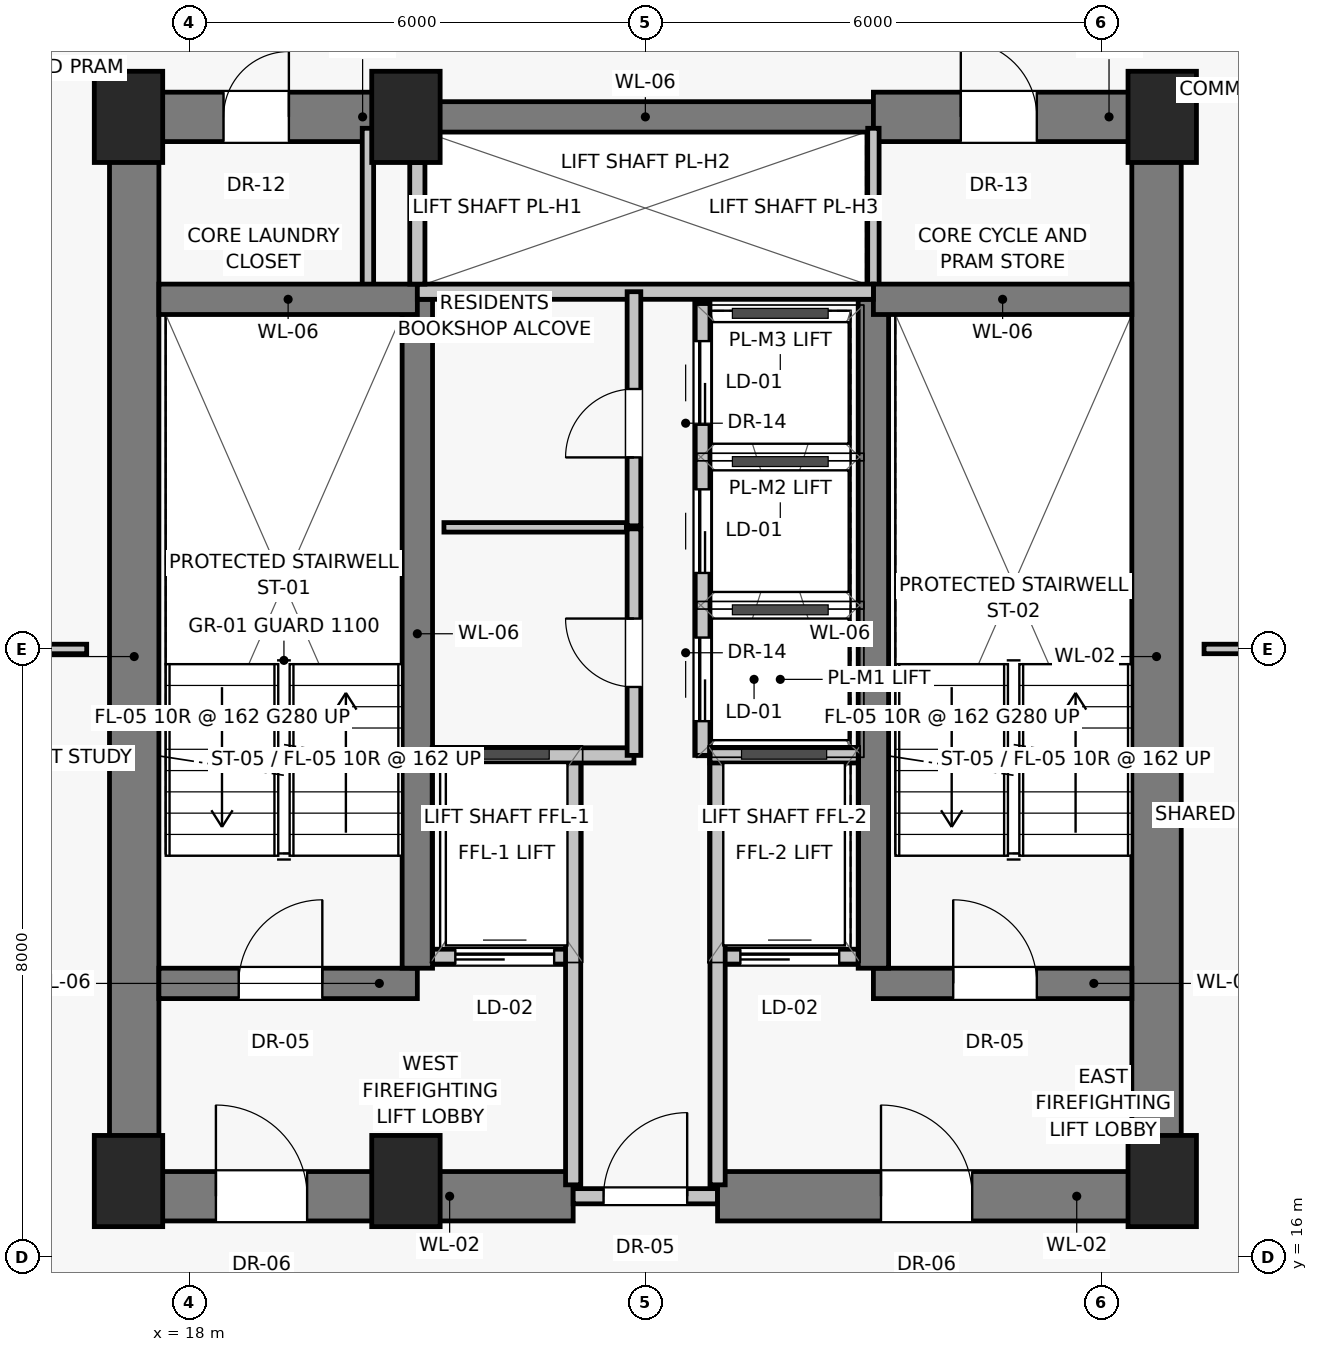
"""IFC4 building model, lengths in metres.
Left out: names, types, materials, properties, quantities, classifications, styles, units other than length and angle.
Written with IfcOpenShell. Run it as: python <this file> out.ifc"""

import sys

from ifc_helpers import new_model, si_unit, direction, frame, frame_2d, origin, origin_2d, place, context, subcontext, project, spatial, rectangle, extrude, source, transform, mapped, element, fill, save


model = new_model("IFC4")
c1 = context("Model", 3, precision=1e-05, world=origin(), true_north=direction((0.0, 1.0)))
c2 = subcontext(c1, "Body", "Model", "MODEL_VIEW")
j1 = project(units=[si_unit("LENGTHUNIT", "METRE"), si_unit("PLANEANGLEUNIT", "RADIAN")], contexts=[c1])
p1 = place(None, origin())
s1 = spatial("IfcSite", under=j1, at=p1, CompositionType="ELEMENT")
p2 = place(p1, origin())
s2 = spatial("IfcBuilding", under=s1, at=p2, CompositionType="ELEMENT")
p3 = place(p2, frame((0.0, 0.0, 102.45)))
s3 = spatial("IfcBuildingStorey", under=s2, at=p3, CompositionType="ELEMENT", Elevation=102.45)
for number, where, z_axis, x_axis in (
    (1, (17.2, 17.0, 0.0), (0.0, 0.0, 1.0), (1.0, 0.0, 0.0)),
    (2, (20.85, 17.0, 0.0), (0.0, 0.0, 1.0), (1.0, 0.0, 0.0)),
    (3, (30.8, 17.0, 0.0), (0.0, 0.0, 1.0), (1.0, 0.0, 0.0)),
    (4, (17.2, 31.0, 0.0), (0.0, 0.0, 1.0), (1.0, 0.0, 0.0)),
    (5, (20.85, 31.0, 0.0), (0.0, 0.0, 1.0), (1.0, 0.0, 0.0)),
    (6, (30.8, 31.0, 0.0), (0.0, 0.0, 1.0), (1.0, 0.0, 0.0)),
):
    element("IfcColumn", number, at=place(p3, frame(where, z_axis=z_axis, x_axis=x_axis)), inside=s3, PredefinedType="PILASTER", context=c2, shape_type="SweptSolid", body=[
        extrude(rectangle(XDim=0.9, YDim=1.2, at=origin_2d()), origin(), (0.0, 0.0, 1.0), 3.25),
    ])
for number, where, z_axis, x_axis in (
    (7, (17.275, 16.8, 0.0), (0.0, 0.0, 1.0), (0.0, 1.0, 0.0)),
    (8, (30.725, 16.8, 0.0), (0.0, 0.0, 1.0), (0.0, 1.0, 0.0)),
):
    element("IfcWall", number, at=place(p3, frame(where, z_axis=z_axis, x_axis=x_axis)), inside=s3, PredefinedType="SHEAR", context=c2, shape_type="SweptSolid", body=[
        extrude(rectangle(XDim=14.2, YDim=0.65, at=frame_2d((7.1, 0.0))), origin(), (0.0, 0.0, 1.0), 3.0),
    ])
p4 = place(p3, frame((17.2, 16.8, 0.0), z_axis=(0.0, 0.0, 1.0), x_axis=(1.0, 0.0, 0.0)))
e9 = element("IfcWall", 9, at=p4, inside=s3, PredefinedType="SHEAR", context=c2, shape_type="SweptSolid", body=[
    extrude(rectangle(XDim=5.85, YDim=0.65, at=frame_2d((2.925, 0.0))), origin(), (0.0, 0.0, 1.0), 3.0),
])
p5 = place(p4, frame((1.15, 0.0, 0.0)))
e10 = element("IfcOpeningElement", 10, at=p5, cuts=e9, PredefinedType="OPENING", context=c2, shape_type="SweptSolid", body=[
    extrude(rectangle(XDim=1.2, YDim=2.03, at=frame_2d((0.6, 1.015))), frame((0.0, 0.335, 0.0), z_axis=(0.0, -1.0, 0.0), x_axis=(1.0, 0.0, 0.0)), (0.0, 0.0, 1.0), 0.67),
])
p6 = place(p3, frame((23.05, 16.8, 0.0), z_axis=(0.0, 0.0, 1.0), x_axis=(1.0, 0.0, 0.0)))
e11 = element("IfcWall", 11, at=p6, inside=s3, PredefinedType="SOLIDWALL", context=c2, shape_type="SweptSolid", body=[
    extrude(rectangle(XDim=1.9, YDim=0.2, at=frame_2d((0.95, 0.0))), origin(), (0.0, 0.0, 1.0), 2.15),
])
p7 = place(p6, frame((0.4, 0.0, 0.0)))
e12 = element("IfcOpeningElement", 12, at=p7, cuts=e11, PredefinedType="OPENING", context=c2, shape_type="SweptSolid", body=[
    extrude(rectangle(XDim=1.1, YDim=2.03, at=frame_2d((0.55, 1.015))), frame((0.0, 0.11, 0.0), z_axis=(0.0, -1.0, 0.0), x_axis=(1.0, 0.0, 0.0)), (0.0, 0.0, 1.0), 0.22),
])
p8 = place(p3, frame((24.95, 16.8, 0.0), z_axis=(0.0, 0.0, 1.0), x_axis=(1.0, 0.0, 0.0)))
e13 = element("IfcWall", 13, at=p8, inside=s3, PredefinedType="SHEAR", context=c2, shape_type="SweptSolid", body=[
    extrude(rectangle(XDim=5.85, YDim=0.65, at=frame_2d((2.925, 0.0))), origin(), (0.0, 0.0, 1.0), 3.0),
])
p9 = place(p8, frame((2.15, 0.0, 0.0)))
e14 = element("IfcOpeningElement", 14, at=p9, cuts=e13, PredefinedType="OPENING", context=c2, shape_type="SweptSolid", body=[
    extrude(rectangle(XDim=1.2, YDim=2.03, at=frame_2d((0.6, 1.015))), frame((0.0, 0.335, 0.0), z_axis=(0.0, -1.0, 0.0), x_axis=(1.0, 0.0, 0.0)), (0.0, 0.0, 1.0), 0.67),
])
p10 = place(p3, frame((17.2, 31.0, 0.0), z_axis=(0.0, 0.0, 1.0), x_axis=(1.0, 0.0, 0.0)))
e15 = element("IfcWall", 15, at=p10, inside=s3, PredefinedType="SHEAR", context=c2, shape_type="SweptSolid", body=[
    extrude(rectangle(XDim=3.8, YDim=0.65, at=frame_2d((1.9, 0.0))), origin(), (0.0, 0.0, 1.0), 3.0),
])
p11 = place(p10, frame((1.25, 0.0, 0.0)))
e16 = element("IfcOpeningElement", 16, at=p11, cuts=e15, PredefinedType="OPENING", context=c2, shape_type="SweptSolid", body=[
    extrude(rectangle(XDim=0.86, YDim=2.01, at=frame_2d((0.43, 1.005))), frame((0.0, 0.335, 0.0), z_axis=(0.0, -1.0, 0.0), x_axis=(1.0, 0.0, 0.0)), (0.0, 0.0, 1.0), 0.67),
])
p12 = place(p3, frame((21.0, 31.0, 0.0), z_axis=(0.0, 0.0, 1.0), x_axis=(1.0, 0.0, 0.0)))
e17 = element("IfcWall", 17, at=p12, inside=s3, PredefinedType="SHEAR", context=c2, shape_type="SweptSolid", body=[
    extrude(rectangle(XDim=6.0, YDim=0.4, at=frame_2d((3.0, 0.0))), origin(), (0.0, 0.0, 1.0), 3.0),
])
p13 = place(p3, frame((27.0, 31.0, 0.0), z_axis=(0.0, 0.0, 1.0), x_axis=(1.0, 0.0, 0.0)))
e18 = element("IfcWall", 18, at=p13, inside=s3, PredefinedType="SHEAR", context=c2, shape_type="SweptSolid", body=[
    extrude(rectangle(XDim=3.8, YDim=0.65, at=frame_2d((1.9, 0.0))), origin(), (0.0, 0.0, 1.0), 3.0),
])
p14 = place(p13, frame((1.15, 0.0, 0.0)))
e19 = element("IfcOpeningElement", 19, at=p14, cuts=e18, PredefinedType="OPENING", context=c2, shape_type="SweptSolid", body=[
    extrude(rectangle(XDim=1.0, YDim=2.01, at=frame_2d((0.5, 1.005))), frame((0.0, 0.335, 0.0), z_axis=(0.0, -1.0, 0.0), x_axis=(1.0, 0.0, 0.0)), (0.0, 0.0, 1.0), 0.67),
])
for number, where, z_axis, x_axis in (
    (20, (20.35, 28.65, 0.0), (0.0, 0.0, 1.0), (0.0, 1.0, 0.0)),
    (21, (27.0, 28.65, 0.0), (0.0, 0.0, 1.0), (0.0, 1.0, 0.0)),
):
    element("IfcWall", number, at=place(p3, frame(where, z_axis=z_axis, x_axis=x_axis)), inside=s3, PredefinedType="PARTITIONING", context=c2, shape_type="SweptSolid", body=[
        extrude(rectangle(XDim=2.2, YDim=0.15, at=frame_2d((1.1, 0.0))), origin(), (0.0, 0.0, 1.0), 3.0),
    ])
p15 = place(p3, frame((17.6, 19.6, 0.0), z_axis=(0.0, 0.0, 1.0), x_axis=(1.0, 0.0, 0.0)))
e22 = element("IfcWall", 22, at=p15, inside=s3, PredefinedType="SHEAR", context=c2, shape_type="SweptSolid", body=[
    extrude(rectangle(XDim=3.4, YDim=0.4, at=frame_2d((1.7, 0.0))), origin(), (0.0, 0.0, 1.0), 3.0),
])
p16 = place(p15, frame((1.05, 0.0, 0.0)))
e23 = element("IfcOpeningElement", 23, at=p16, cuts=e22, PredefinedType="OPENING", context=c2, shape_type="SweptSolid", body=[
    extrude(rectangle(XDim=1.1, YDim=2.03, at=frame_2d((0.55, 1.015))), frame((0.0, 0.21, 0.0), z_axis=(0.0, -1.0, 0.0), x_axis=(1.0, 0.0, 0.0)), (0.0, 0.0, 1.0), 0.42),
])
p17 = place(p3, frame((21.2, 19.95, 0.0), z_axis=(0.0, 0.0, 1.0), x_axis=(1.0, 0.0, 0.0)))
e24 = element("IfcWall", 24, at=p17, inside=s3, PredefinedType="SOLIDWALL", context=c2, shape_type="SweptSolid", body=[
    extrude(rectangle(XDim=1.85, YDim=0.2, at=frame_2d((0.925, 0.0))), origin(), (0.0, 0.0, 1.0), 3.0),
])
p18 = place(p17, frame((0.3, 0.0, 0.0)))
e25 = element("IfcOpeningElement", 25, at=p18, cuts=e24, PredefinedType="OPENING", context=c2, shape_type="SweptSolid", body=[
    extrude(rectangle(XDim=1.3, YDim=2.25, at=frame_2d((0.65, 1.125))), frame((0.0, 0.11, 0.0), z_axis=(0.0, -1.0, 0.0), x_axis=(1.0, 0.0, 0.0)), (0.0, 0.0, 1.0), 0.22),
])
p19 = place(p3, frame((24.95, 19.95, 0.0), z_axis=(0.0, 0.0, 1.0), x_axis=(1.0, 0.0, 0.0)))
e26 = element("IfcWall", 26, at=p19, inside=s3, PredefinedType="SOLIDWALL", context=c2, shape_type="SweptSolid", body=[
    extrude(rectangle(XDim=1.85, YDim=0.2, at=frame_2d((0.925, 0.0))), origin(), (0.0, 0.0, 1.0), 3.0),
])
p20 = place(p19, frame((0.3, 0.0, 0.0)))
e27 = element("IfcOpeningElement", 27, at=p20, cuts=e26, PredefinedType="OPENING", context=c2, shape_type="SweptSolid", body=[
    extrude(rectangle(XDim=1.3, YDim=2.25, at=frame_2d((0.65, 1.125))), frame((0.0, 0.11, 0.0), z_axis=(0.0, -1.0, 0.0), x_axis=(1.0, 0.0, 0.0)), (0.0, 0.0, 1.0), 0.22),
])
p21 = place(p3, frame((27.0, 19.6, 0.0), z_axis=(0.0, 0.0, 1.0), x_axis=(1.0, 0.0, 0.0)))
e28 = element("IfcWall", 28, at=p21, inside=s3, PredefinedType="SHEAR", context=c2, shape_type="SweptSolid", body=[
    extrude(rectangle(XDim=3.4, YDim=0.4, at=frame_2d((1.7, 0.0))), origin(), (0.0, 0.0, 1.0), 3.0),
])
p22 = place(p21, frame((1.05, 0.0, 0.0)))
e29 = element("IfcOpeningElement", 29, at=p22, cuts=e28, PredefinedType="OPENING", context=c2, shape_type="SweptSolid", body=[
    extrude(rectangle(XDim=1.1, YDim=2.03, at=frame_2d((0.55, 1.015))), frame((0.0, 0.21, 0.0), z_axis=(0.0, -1.0, 0.0), x_axis=(1.0, 0.0, 0.0)), (0.0, 0.0, 1.0), 0.42),
])
for number, where, z_axis, x_axis in (
    (30, (21.0, 19.8, 0.0), (0.0, 0.0, 1.0), (0.0, 1.0, 0.0)),
    (31, (27.0, 19.8, 0.0), (0.0, 0.0, 1.0), (0.0, 1.0, 0.0)),
):
    element("IfcWall", number, at=place(p3, frame(where, z_axis=z_axis, x_axis=x_axis)), inside=s3, PredefinedType="SHEAR", context=c2, shape_type="SweptSolid", body=[
        extrude(rectangle(XDim=8.8, YDim=0.4, at=frame_2d((4.4, 0.0))), origin(), (0.0, 0.0, 1.0), 3.0),
    ])
for number, where, z_axis, x_axis in (
    (32, (17.6, 28.6, 0.0), (0.0, 0.0, 1.0), (1.0, 0.0, 0.0)),
    (33, (27.0, 28.6, 0.0), (0.0, 0.0, 1.0), (1.0, 0.0, 0.0)),
):
    element("IfcWall", number, at=place(p3, frame(where, z_axis=z_axis, x_axis=x_axis)), inside=s3, PredefinedType="SHEAR", context=c2, shape_type="SweptSolid", body=[
        extrude(rectangle(XDim=3.4, YDim=0.4, at=frame_2d((1.7, 0.0))), origin(), (0.0, 0.0, 1.0), 3.0),
    ])
for number, where, z_axis, x_axis in (
    (34, (23.05, 16.95, 0.0), (0.0, 0.0, 1.0), (0.0, 1.0, 0.0)),
    (35, (24.95, 16.95, 0.0), (0.0, 0.0, 1.0), (0.0, 1.0, 0.0)),
):
    element("IfcWall", number, at=place(p3, frame(where, z_axis=z_axis, x_axis=x_axis)), inside=s3, PredefinedType="SOLIDWALL", context=c2, shape_type="SweptSolid", body=[
        extrude(rectangle(XDim=5.6, YDim=0.2, at=frame_2d((2.8, 0.0))), origin(), (0.0, 0.0, 1.0), 3.0),
    ])
p23 = place(p3, frame((21.2, 22.6, 0.0), z_axis=(0.0, 0.0, 1.0), x_axis=(1.0, 0.0, 0.0)))
e36 = element("IfcWall", 36, at=p23, inside=s3, PredefinedType="SOLIDWALL", context=c2, shape_type="SweptSolid", body=[
    extrude(rectangle(XDim=2.65, YDim=0.2, at=frame_2d((1.325, 0.0))), origin(), (0.0, 0.0, 1.0), 3.0),
])
p24 = place(p3, frame((24.85, 22.6, 0.0), z_axis=(0.0, 0.0, 1.0), x_axis=(1.0, 0.0, 0.0)))
e37 = element("IfcWall", 37, at=p24, inside=s3, PredefinedType="SOLIDWALL", context=c2, shape_type="SweptSolid", body=[
    extrude(rectangle(XDim=1.95, YDim=0.2, at=frame_2d((0.975, 0.0))), origin(), (0.0, 0.0, 1.0), 3.0),
])
p25 = place(p3, frame((21.0, 28.7, 0.0), z_axis=(0.0, 0.0, 1.0), x_axis=(1.0, 0.0, 0.0)))
e38 = element("IfcWall", 38, at=p25, inside=s3, PredefinedType="SOLIDWALL", context=c2, shape_type="SweptSolid", body=[
    extrude(rectangle(XDim=6.0, YDim=0.2, at=frame_2d((3.0, 0.0))), origin(), (0.0, 0.0, 1.0), 3.0),
])
p26 = place(p3, frame((21.0, 28.8, 0.0), z_axis=(0.0, 0.0, 1.0), x_axis=(0.0, 1.0, 0.0)))
e39 = element("IfcWall", 39, at=p26, inside=s3, PredefinedType="SOLIDWALL", context=c2, shape_type="SweptSolid", body=[
    extrude(rectangle(XDim=1.6, YDim=0.2, at=frame_2d((0.8, 0.0))), origin(), (0.0, 0.0, 1.0), 3.0),
])
p27 = place(p3, frame((23.85, 22.6, 0.0), z_axis=(0.0, 0.0, 1.0), x_axis=(0.0, 1.0, 0.0)))
e40 = element("IfcWall", 40, at=p27, inside=s3, PredefinedType="PARTITIONING", context=c2, shape_type="SweptSolid", body=[
    extrude(rectangle(XDim=2.98, YDim=0.18, at=frame_2d((1.49, 0.0))), origin(), (0.0, 0.0, 1.0), 3.0),
])
p28 = place(p27, frame((0.9, 0.0, 0.0)))
e41 = element("IfcOpeningElement", 41, at=p28, cuts=e40, PredefinedType="OPENING", context=c2, shape_type="SweptSolid", body=[
    extrude(rectangle(XDim=0.9, YDim=2.01, at=frame_2d((0.45, 1.005))), frame((0.0, 0.1, 0.0), z_axis=(0.0, -1.0, 0.0), x_axis=(1.0, 0.0, 0.0)), (0.0, 0.0, 1.0), 0.2),
])
p29 = place(p3, frame((23.85, 25.62, 0.0), z_axis=(0.0, 0.0, 1.0), x_axis=(0.0, 1.0, 0.0)))
e42 = element("IfcWall", 42, at=p29, inside=s3, PredefinedType="PARTITIONING", context=c2, shape_type="SweptSolid", body=[
    extrude(rectangle(XDim=3.08, YDim=0.18, at=frame_2d((1.54, 0.0))), origin(), (0.0, 0.0, 1.0), 3.0),
])
p30 = place(p29, frame((0.9, 0.0, 0.0)))
e43 = element("IfcOpeningElement", 43, at=p30, cuts=e42, PredefinedType="OPENING", context=c2, shape_type="SweptSolid", body=[
    extrude(rectangle(XDim=0.9, YDim=2.01, at=frame_2d((0.45, 1.005))), frame((0.0, 0.1, 0.0), z_axis=(0.0, -1.0, 0.0), x_axis=(1.0, 0.0, 0.0)), (0.0, 0.0, 1.0), 0.2),
])
p31 = place(p3, frame((24.75, 22.6, 0.0), z_axis=(0.0, 0.0, 1.0), x_axis=(0.0, 1.0, 0.0)))
e44 = element("IfcWall", 44, at=p31, inside=s3, PredefinedType="SOLIDWALL", context=c2, shape_type="SweptSolid", body=[
    extrude(rectangle(XDim=5.95, YDim=0.2, at=frame_2d((2.975, 0.0))), origin(), (0.0, 0.0, 1.0), 3.0),
])
p32 = place(p31, frame((0.45, 0.0, 0.0)))
e45 = element("IfcOpeningElement", 45, at=p32, cuts=e44, PredefinedType="OPENING", context=c2, shape_type="SweptSolid", body=[
    extrude(rectangle(XDim=1.1, YDim=2.08, at=frame_2d((0.55, 1.04))), frame((0.0, 0.11, 0.0), z_axis=(0.0, -1.0, 0.0), x_axis=(1.0, 0.0, 0.0)), (0.0, 0.0, 1.0), 0.22),
])
p33 = place(p31, frame((2.4, 0.0, 0.0)))
e46 = element("IfcOpeningElement", 46, at=p33, cuts=e44, PredefinedType="OPENING", context=c2, shape_type="SweptSolid", body=[
    extrude(rectangle(XDim=1.1, YDim=2.08, at=frame_2d((0.55, 1.04))), frame((0.0, 0.11, 0.0), z_axis=(0.0, -1.0, 0.0), x_axis=(1.0, 0.0, 0.0)), (0.0, 0.0, 1.0), 0.22),
])
p34 = place(p31, frame((4.35, 0.0, 0.0)))
e47 = element("IfcOpeningElement", 47, at=p34, cuts=e44, PredefinedType="OPENING", context=c2, shape_type="SweptSolid", body=[
    extrude(rectangle(XDim=1.1, YDim=2.08, at=frame_2d((0.55, 1.04))), frame((0.0, 0.11, 0.0), z_axis=(0.0, -1.0, 0.0), x_axis=(1.0, 0.0, 0.0)), (0.0, 0.0, 1.0), 0.22),
])
p35 = place(p3, frame((21.35, 25.6, 0.0), z_axis=(0.0, 0.0, 1.0), x_axis=(1.0, 0.0, 0.0)))
e48 = element("IfcWall", 48, at=p35, inside=s3, PredefinedType="PARTITIONING", context=c2, shape_type="SweptSolid", body=[
    extrude(rectangle(XDim=2.4, YDim=0.125, at=frame_2d((1.2, 0.0))), origin(), (0.0, 0.0, 1.0), 3.0),
])
for number, where, z_axis, x_axis in (
    (49, (14.55, 24.0, 0.0), (0.0, 0.0, 1.0), (1.0, 0.0, 0.0)),
    (50, (31.35, 24.0, 0.0), (0.0, 0.0, 1.0), (1.0, 0.0, 0.0)),
):
    element("IfcWall", number, at=place(p3, frame(where, z_axis=z_axis, x_axis=x_axis)), inside=s3, PredefinedType="PARTITIONING", context=c2, shape_type="SweptSolid", body=[
        extrude(rectangle(XDim=2.1, YDim=0.125, at=frame_2d((1.05, 0.0))), origin(), (0.0, 0.0, 1.0), 3.0),
    ])
m1 = source(origin(), c2, "Body", "SweptSolid", [
    extrude(rectangle(XDim=1.2, YDim=2.03, at=frame_2d((0.6, 1.015))), frame((0.0, 0.025, 0.0), z_axis=(0.0, -1.0, 0.0), x_axis=(1.0, 0.0, 0.0)), (0.0, 0.0, 1.0), 0.05),
])
p36 = place(p5, origin())
e51 = element("IfcDoor", 51, at=p36, inside=s3, OperationType="SINGLE_SWING_LEFT", PredefinedType="DOOR", context=c2, shape_type="MappedRepresentation", body=[
    mapped(m1, transform((0.0, 0.0, 0.0), scale=1.0)),
])
fill(e10, e51)
m2 = source(origin(), c2, "Body", "SweptSolid", [
    extrude(rectangle(XDim=1.1, YDim=2.03, at=frame_2d((0.55, 1.015))), frame((0.0, 0.025, 0.0), z_axis=(0.0, -1.0, 0.0), x_axis=(1.0, 0.0, 0.0)), (0.0, 0.0, 1.0), 0.05),
])
p37 = place(p7, origin())
e52 = element("IfcDoor", 52, at=p37, inside=s3, OperationType="SINGLE_SWING_RIGHT", PredefinedType="DOOR", context=c2, shape_type="MappedRepresentation", body=[
    mapped(m2, transform((0.0, 0.0, 0.0), scale=1.0)),
])
fill(e12, e52)
p38 = place(p9, origin())
e53 = element("IfcDoor", 53, at=p38, inside=s3, OperationType="SINGLE_SWING_LEFT", PredefinedType="DOOR", context=c2, shape_type="MappedRepresentation", body=[
    mapped(m1, transform((0.0, 0.0, 0.0), scale=1.0)),
])
fill(e14, e53)
m3 = source(origin(), c2, "Body", "SweptSolid", [
    extrude(rectangle(XDim=0.86, YDim=2.01, at=frame_2d((0.43, 1.005))), frame((0.0, 0.025, 0.0), z_axis=(0.0, -1.0, 0.0), x_axis=(1.0, 0.0, 0.0)), (0.0, 0.0, 1.0), 0.05),
])
p39 = place(p11, origin())
e54 = element("IfcDoor", 54, at=p39, inside=s3, OperationType="SINGLE_SWING_RIGHT", PredefinedType="DOOR", context=c2, shape_type="MappedRepresentation", body=[
    mapped(m3, transform((0.0, 0.0, 0.0), scale=1.0)),
])
fill(e16, e54)
m4 = source(origin(), c2, "Body", "SweptSolid", [
    extrude(rectangle(XDim=1.0, YDim=2.01, at=frame_2d((0.5, 1.005))), frame((0.0, 0.025, 0.0), z_axis=(0.0, -1.0, 0.0), x_axis=(1.0, 0.0, 0.0)), (0.0, 0.0, 1.0), 0.05),
])
p40 = place(p14, origin())
e55 = element("IfcDoor", 55, at=p40, inside=s3, OperationType="SINGLE_SWING_LEFT", PredefinedType="DOOR", context=c2, shape_type="MappedRepresentation", body=[
    mapped(m4, transform((0.0, 0.0, 0.0), scale=1.0)),
])
fill(e19, e55)
p41 = place(p16, origin())
e56 = element("IfcDoor", 56, at=p41, inside=s3, OperationType="SINGLE_SWING_RIGHT", PredefinedType="DOOR", context=c2, shape_type="MappedRepresentation", body=[
    mapped(m2, transform((0.0, 0.0, 0.0), scale=1.0)),
])
fill(e23, e56)
m5 = source(origin(), c2, "Body", "SweptSolid", [
    extrude(rectangle(XDim=1.3, YDim=2.25, at=frame_2d((0.65, 1.125))), frame((0.0, 0.025, 0.0), z_axis=(0.0, -1.0, 0.0), x_axis=(1.0, 0.0, 0.0)), (0.0, 0.0, 1.0), 0.05),
])
p42 = place(p18, origin())
e57 = element("IfcDoor", 57, at=p42, inside=s3, OperationType="SLIDING_TO_LEFT", PredefinedType="DOOR", context=c2, shape_type="MappedRepresentation", body=[
    mapped(m5, transform((0.0, 0.0, 0.0), scale=1.0)),
])
fill(e25, e57)
p43 = place(p20, origin())
e58 = element("IfcDoor", 58, at=p43, inside=s3, OperationType="SLIDING_TO_LEFT", PredefinedType="DOOR", context=c2, shape_type="MappedRepresentation", body=[
    mapped(m5, transform((0.0, 0.0, 0.0), scale=1.0)),
])
fill(e27, e58)
p44 = place(p22, origin())
e59 = element("IfcDoor", 59, at=p44, inside=s3, OperationType="SINGLE_SWING_LEFT", PredefinedType="DOOR", context=c2, shape_type="MappedRepresentation", body=[
    mapped(m2, transform((0.0, 0.0, 0.0), scale=1.0)),
])
fill(e29, e59)
m6 = source(origin(), c2, "Body", "SweptSolid", [
    extrude(rectangle(XDim=0.9, YDim=2.01, at=frame_2d((0.45, 1.005))), frame((0.0, 0.025, 0.0), z_axis=(0.0, -1.0, 0.0), x_axis=(1.0, 0.0, 0.0)), (0.0, 0.0, 1.0), 0.05),
])
p45 = place(p28, origin())
e60 = element("IfcDoor", 60, at=p45, inside=s3, OperationType="SINGLE_SWING_RIGHT", PredefinedType="DOOR", context=c2, shape_type="MappedRepresentation", body=[
    mapped(m6, transform((0.0, 0.0, 0.0), scale=1.0)),
])
fill(e41, e60)
p46 = place(p30, origin())
e61 = element("IfcDoor", 61, at=p46, inside=s3, OperationType="SINGLE_SWING_LEFT", PredefinedType="DOOR", context=c2, shape_type="MappedRepresentation", body=[
    mapped(m6, transform((0.0, 0.0, 0.0), scale=1.0)),
])
fill(e43, e61)
m7 = source(origin(), c2, "Body", "SweptSolid", [
    extrude(rectangle(XDim=1.1, YDim=2.08, at=frame_2d((0.55, 1.04))), frame((0.0, 0.025, 0.0), z_axis=(0.0, -1.0, 0.0), x_axis=(1.0, 0.0, 0.0)), (0.0, 0.0, 1.0), 0.05),
])
p47 = place(p32, origin())
e62 = element("IfcDoor", 62, at=p47, inside=s3, OperationType="SLIDING_TO_LEFT", PredefinedType="DOOR", context=c2, shape_type="MappedRepresentation", body=[
    mapped(m7, transform((0.0, 0.0, 0.0), scale=1.0)),
])
fill(e45, e62)
p48 = place(p33, origin())
e63 = element("IfcDoor", 63, at=p48, inside=s3, OperationType="SLIDING_TO_LEFT", PredefinedType="DOOR", context=c2, shape_type="MappedRepresentation", body=[
    mapped(m7, transform((0.0, 0.0, 0.0), scale=1.0)),
])
fill(e46, e63)
p49 = place(p34, origin())
e64 = element("IfcDoor", 64, at=p49, inside=s3, OperationType="SLIDING_TO_LEFT", PredefinedType="DOOR", context=c2, shape_type="MappedRepresentation", body=[
    mapped(m7, transform((0.0, 0.0, 0.0), scale=1.0)),
])
fill(e47, e64)
save(model, sys.argv[1])
